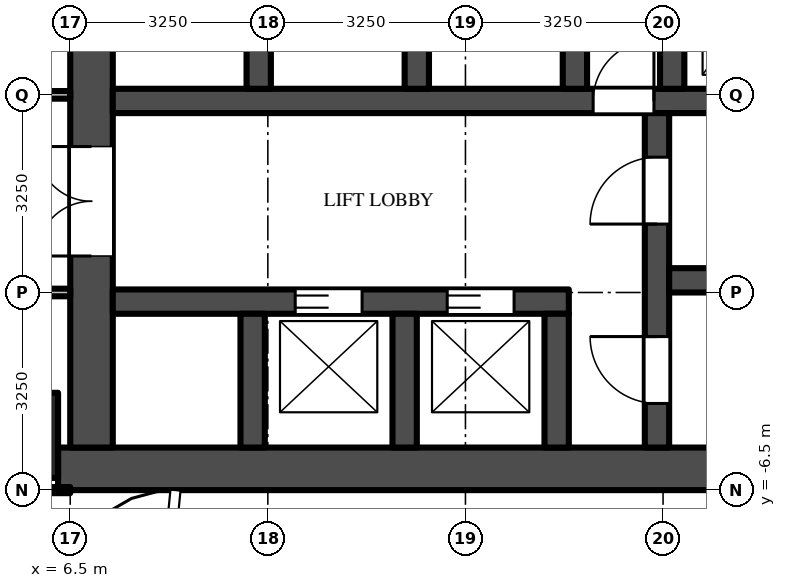
"""IFC4 building model, lengths in metres.
Left out: names, types, materials, properties, quantities, classifications, styles, units other than length and angle.
Written with IfcOpenShell. Run it as: python <this file> out.ifc"""

import sys

from ifc_helpers import new_model, si_unit, direction, frame, frame_2d, origin, origin_2d, place, context, subcontext, project, spatial, rectangle, extrude, source, transform, mapped, element, fill, save


model = new_model("IFC4")
c1 = context("Model", 3, precision=1e-05, world=origin(), true_north=direction((0.0, 1.0)))
c2 = subcontext(c1, "Body", "Model", "MODEL_VIEW")
j1 = project(units=[si_unit("LENGTHUNIT", "METRE"), si_unit("PLANEANGLEUNIT", "RADIAN")], contexts=[c1])
p1 = place(None, origin())
s1 = spatial("IfcSite", under=j1, at=p1, CompositionType="ELEMENT")
p2 = place(p1, origin())
s2 = spatial("IfcBuilding", under=s1, at=p2, CompositionType="ELEMENT")
p3 = place(p2, frame((0.0, 0.0, 88.0)))
s3 = spatial("IfcBuildingStorey", under=s2, at=p3, CompositionType="ELEMENT", Elevation=88.0)
m1 = source(origin(), c2, "Body", "SweptSolid", [
    extrude(rectangle(XDim=1.4, YDim=1.4, at=origin_2d()), origin(), (0.0, 0.0, 1.0), 4.5),
])
p4 = place(p3, frame((5.6, -5.6, 0.0), z_axis=(0.0, 0.0, 1.0), x_axis=(1.0, 0.0, 0.0)))
e1 = element("IfcColumn", 1, at=p4, inside=s3, PredefinedType="COLUMN", context=c2, shape_type="MappedRepresentation", body=[
    mapped(m1, transform((0.0, 0.0, 0.0))),
])
m2 = source(origin(), c2, "Body", "SweptSolid", [
    extrude(rectangle(XDim=16.45, YDim=0.7, at=frame_2d((8.225, 0.0))), origin(), (0.0, 0.0, 1.0), 4.2),
])
p5 = place(p3, frame((6.3, -6.15, 0.0), z_axis=(0.0, 0.0, 1.0), x_axis=(1.0, 0.0, 0.0)))
e2 = element("IfcWall", 2, at=p5, inside=s3, PredefinedType="SHEAR", context=c2, shape_type="MappedRepresentation", body=[
    mapped(m2, transform((0.0, 0.0, 0.0))),
])
m3 = source(origin(), c2, "Body", "SweptSolid", [
    extrude(rectangle(XDim=9.05, YDim=0.7, at=frame_2d((4.525, 0.0))), origin(), (0.0, 0.0, 1.0), 4.2),
])
p6 = place(p3, frame((6.85, -5.8, 0.0), z_axis=(0.0, 0.0, 1.0), x_axis=(0.0, 1.0, 0.0)))
e3 = element("IfcWall", 3, at=p6, inside=s3, PredefinedType="SHEAR", context=c2, shape_type="MappedRepresentation", body=[
    mapped(m3, transform((0.0, 0.0, 0.0))),
])
m4 = source(origin(), c2, "Body", "SweptSolid", [
    extrude(rectangle(XDim=1.8, YDim=2.1, at=frame_2d((0.9, 1.05))), frame((0.0, 0.36, 0.0), z_axis=(0.0, -1.0, 0.0), x_axis=(1.0, 0.0, 0.0)), (0.0, 0.0, 1.0), 0.72),
])
p7 = place(p6, frame((3.15, 0.0, 0.0)))
e4 = element("IfcOpeningElement", 4, at=p7, cuts=e3, PredefinedType="OPENING", context=c2, shape_type="MappedRepresentation", body=[
    mapped(m4, transform((0.0, 0.0, 0.0))),
])
m5 = source(origin(), c2, "Body", "SweptSolid", [
    extrude(rectangle(XDim=7.5, YDim=0.4, at=frame_2d((3.75, 0.0))), origin(), (0.0, 0.0, 1.0), 4.2),
])
p8 = place(p3, frame((7.2, -3.4, 0.0), z_axis=(0.0, 0.0, 1.0), x_axis=(1.0, 0.0, 0.0)))
e5 = element("IfcWall", 5, at=p8, inside=s3, PredefinedType="SHEAR", context=c2, shape_type="MappedRepresentation", body=[
    mapped(m5, transform((0.0, 0.0, 0.0))),
])
m6 = source(origin(), c2, "Body", "SweptSolid", [
    extrude(rectangle(XDim=1.1, YDim=2.1, at=frame_2d((0.55, 1.05))), frame((0.0, 0.21, 0.0), z_axis=(0.0, -1.0, 0.0), x_axis=(1.0, 0.0, 0.0)), (0.0, 0.0, 1.0), 0.42),
])
p9 = place(p8, frame((3.0, 0.0, 0.0)))
e6 = element("IfcOpeningElement", 6, at=p9, cuts=e5, PredefinedType="OPENING", context=c2, shape_type="MappedRepresentation", body=[
    mapped(m6, transform((0.0, 0.0, 0.0))),
])
p10 = place(p8, frame((5.5, 0.0, 0.0)))
e7 = element("IfcOpeningElement", 7, at=p10, cuts=e5, PredefinedType="OPENING", context=c2, shape_type="MappedRepresentation", body=[
    mapped(m6, transform((0.0, 0.0, 0.0))),
])
m7 = source(origin(), c2, "Body", "SweptSolid", [
    extrude(rectangle(XDim=14.85, YDim=0.4, at=frame_2d((7.425, 0.0))), origin(), (0.0, 0.0, 1.0), 4.2),
])
p11 = place(p3, frame((7.2, -0.1, 0.0), z_axis=(0.0, 0.0, 1.0), x_axis=(1.0, 0.0, 0.0)))
e8 = element("IfcWall", 8, at=p11, inside=s3, PredefinedType="SHEAR", context=c2, shape_type="MappedRepresentation", body=[
    mapped(m7, transform((0.0, 0.0, 0.0))),
])
m8 = source(origin(), c2, "Body", "SweptSolid", [
    extrude(rectangle(XDim=1.0, YDim=2.1, at=frame_2d((0.5, 1.05))), frame((0.0, 0.21, 0.0), z_axis=(0.0, -1.0, 0.0), x_axis=(1.0, 0.0, 0.0)), (0.0, 0.0, 1.0), 0.42),
])
p12 = place(p11, frame((7.9, 0.0, 0.0)))
e9 = element("IfcOpeningElement", 9, at=p12, cuts=e8, PredefinedType="OPENING", context=c2, shape_type="MappedRepresentation", body=[
    mapped(m8, transform((0.0, 0.0, 0.0))),
])
m9 = source(origin(), c2, "Body", "SweptSolid", [
    extrude(rectangle(XDim=5.5, YDim=0.4, at=frame_2d((2.75, 0.0))), origin(), (0.0, 0.0, 1.0), 4.2),
])
p13 = place(p3, frame((16.15, -5.8, 0.0), z_axis=(0.0, 0.0, 1.0), x_axis=(0.0, 1.0, 0.0)))
e10 = element("IfcWall", 10, at=p13, inside=s3, PredefinedType="SHEAR", context=c2, shape_type="MappedRepresentation", body=[
    mapped(m9, transform((0.0, 0.0, 0.0))),
])
p14 = place(p13, frame((0.725, 0.0, 0.0)))
e11 = element("IfcOpeningElement", 11, at=p14, cuts=e10, PredefinedType="OPENING", context=c2, shape_type="MappedRepresentation", body=[
    mapped(m6, transform((0.0, 0.0, 0.0))),
])
p15 = place(p13, frame((3.675, 0.0, 0.0)))
e12 = element("IfcOpeningElement", 12, at=p15, cuts=e10, PredefinedType="OPENING", context=c2, shape_type="MappedRepresentation", body=[
    mapped(m6, transform((0.0, 0.0, 0.0))),
])
m10 = source(origin(), c2, "Body", "SweptSolid", [
    extrude(rectangle(XDim=5.7, YDim=0.4, at=frame_2d((2.85, 0.0))), origin(), (0.0, 0.0, 1.0), 4.2),
])
p16 = place(p3, frame((16.35, -3.05, 0.0), z_axis=(0.0, 0.0, 1.0), x_axis=(1.0, 0.0, 0.0)))
e13 = element("IfcWall", 13, at=p16, inside=s3, PredefinedType="SHEAR", context=c2, shape_type="MappedRepresentation", body=[
    mapped(m10, transform((0.0, 0.0, 0.0))),
])
m11 = source(origin(), c2, "Body", "SweptSolid", [
    extrude(rectangle(XDim=2.2, YDim=0.4, at=frame_2d((1.1, 0.0))), origin(), (0.0, 0.0, 1.0), 4.2),
])
for number, where, z_axis, x_axis in (
    (14, (9.5, -5.8, 0.0), (0.0, 0.0, 1.0), (0.0, 1.0, 0.0)),
    (15, (12.0, -5.8, 0.0), (0.0, 0.0, 1.0), (0.0, 1.0, 0.0)),
    (16, (14.5, -5.8, 0.0), (0.0, 0.0, 1.0), (0.0, 1.0, 0.0)),
):
    element("IfcWall", number, at=place(p3, frame(where, z_axis=z_axis, x_axis=x_axis)), inside=s3, PredefinedType="SHEAR", context=c2, shape_type="MappedRepresentation", body=[
        mapped(m11, transform((0.0, 0.0, 0.0))),
    ])
m12 = source(origin(), c2, "Body", "SweptSolid", [
    extrude(rectangle(XDim=2.45, YDim=0.4, at=frame_2d((1.225, 0.0))), origin(), (0.0, 0.0, 1.0), 4.2),
])
for number, where, z_axis, x_axis in (
    (17, (9.6, 0.1, 0.0), (0.0, 0.0, 1.0), (0.0, 1.0, 0.0)),
    (18, (12.2, 0.1, 0.0), (0.0, 0.0, 1.0), (0.0, 1.0, 0.0)),
    (19, (14.8, 0.1, 0.0), (0.0, 0.0, 1.0), (0.0, 1.0, 0.0)),
    (20, (16.4, 0.1, 0.0), (0.0, 0.0, 1.0), (0.0, 1.0, 0.0)),
):
    element("IfcWall", number, at=place(p3, frame(where, z_axis=z_axis, x_axis=x_axis)), inside=s3, PredefinedType="SHEAR", context=c2, shape_type="MappedRepresentation", body=[
        mapped(m12, transform((0.0, 0.0, 0.0))),
    ])
m13 = source(origin(), c2, "Body", "SweptSolid", [
    extrude(rectangle(XDim=5.363, YDim=0.1, at=frame_2d((2.681, 0.0))), origin(), (0.0, 0.0, 1.0), 3.28),
])
p17 = place(p3, frame((1.137, -6.5, 0.0), z_axis=(0.0, 0.0, 1.0), x_axis=(1.0, 0.0, 0.0)))
e21 = element("IfcWall", 21, at=p17, inside=s3, PredefinedType="PARTITIONING", context=c2, shape_type="MappedRepresentation", body=[
    mapped(m13, transform((0.0, 0.0, 0.0))),
])
m14 = source(origin(), c2, "Body", "SweptSolid", [
    extrude(rectangle(XDim=5.363, YDim=0.125, at=frame_2d((2.681, 0.0))), origin(), (0.0, 0.0, 1.0), 3.418),
])
p18 = place(p3, frame((6.5, -3.25, 0.0), z_axis=(0.0, 0.0, 1.0), x_axis=(-1.0, 0.0, 0.0)))
e22 = element("IfcWall", 22, at=p18, inside=s3, PredefinedType="PARTITIONING", context=c2, shape_type="MappedRepresentation", body=[
    mapped(m14, transform((0.0, 0.0, 0.0))),
])
m15 = source(origin(), c2, "Body", "SweptSolid", [
    extrude(rectangle(XDim=1.1, YDim=2.1, at=frame_2d((0.55, 1.05))), frame((0.0, 0.073, 0.0), z_axis=(0.0, -1.0, 0.0), x_axis=(1.0, 0.0, 0.0)), (0.0, 0.0, 1.0), 0.145),
])
p19 = place(p18, frame((0.35, 0.0, 0.0)))
e23 = element("IfcOpeningElement", 23, at=p19, cuts=e22, PredefinedType="OPENING", context=c2, shape_type="MappedRepresentation", body=[
    mapped(m15, transform((0.0, 0.0, 0.0))),
])
p20 = place(p3, frame((6.5, 0.0, 0.0), z_axis=(0.0, 0.0, 1.0), x_axis=(-1.0, 0.0, 0.0)))
e24 = element("IfcWall", 24, at=p20, inside=s3, PredefinedType="PARTITIONING", context=c2, shape_type="MappedRepresentation", body=[
    mapped(m14, transform((0.0, 0.0, 0.0))),
])
m16 = source(origin(), c2, "Body", "SweptSolid", [
    extrude(rectangle(XDim=1.0, YDim=2.1, at=frame_2d((0.5, 1.05))), frame((0.0, 0.073, 0.0), z_axis=(0.0, -1.0, 0.0), x_axis=(1.0, 0.0, 0.0)), (0.0, 0.0, 1.0), 0.145),
])
p21 = place(p20, frame((3.95, 0.0, 0.0)))
e25 = element("IfcOpeningElement", 25, at=p21, cuts=e24, PredefinedType="OPENING", context=c2, shape_type="MappedRepresentation", body=[
    mapped(m16, transform((0.0, 0.0, 0.0))),
])
m17 = source(origin(), c2, "Body", "SweptSolid", [
    extrude(rectangle(XDim=1.1, YDim=2.1, at=frame_2d((0.55, 1.05))), frame((0.0, 0.025, 0.0), z_axis=(0.0, -1.0, 0.0), x_axis=(1.0, 0.0, 0.0)), (0.0, 0.0, 1.0), 0.05),
])
p22 = place(p9, origin())
e26 = element("IfcDoor", 26, at=p22, inside=s3, OperationType="DOUBLE_DOOR_SLIDING", PredefinedType="DOOR", context=c2, shape_type="MappedRepresentation", body=[
    mapped(m17, transform((0.0, 0.0, 0.0))),
])
fill(e6, e26)
p23 = place(p10, origin())
e27 = element("IfcDoor", 27, at=p23, inside=s3, OperationType="DOUBLE_DOOR_SLIDING", PredefinedType="DOOR", context=c2, shape_type="MappedRepresentation", body=[
    mapped(m17, transform((0.0, 0.0, 0.0))),
])
fill(e7, e27)
m18 = source(origin(), c2, "Body", "SweptSolid", [
    extrude(rectangle(XDim=1.8, YDim=2.1, at=frame_2d((0.9, 1.05))), frame((0.0, -0.275, 0.0), z_axis=(0.0, -1.0, 0.0), x_axis=(1.0, 0.0, 0.0)), (0.0, 0.0, 1.0), 0.05),
])
p24 = place(p7, origin())
e28 = element("IfcDoor", 28, at=p24, inside=s3, OperationType="DOUBLE_DOOR_SINGLE_SWING", PredefinedType="DOOR", context=c2, shape_type="MappedRepresentation", body=[
    mapped(m18, transform((0.0, 0.0, 0.0))),
])
fill(e4, e28)
p25 = place(p14, origin())
e29 = element("IfcDoor", 29, at=p25, inside=s3, OperationType="SINGLE_SWING_RIGHT", PredefinedType="DOOR", context=c2, shape_type="MappedRepresentation", body=[
    mapped(m17, transform((0.0, 0.0, 0.0))),
])
fill(e11, e29)
p26 = place(p15, origin())
e30 = element("IfcDoor", 30, at=p26, inside=s3, OperationType="SINGLE_SWING_LEFT", PredefinedType="DOOR", context=c2, shape_type="MappedRepresentation", body=[
    mapped(m17, transform((0.0, 0.0, 0.0))),
])
fill(e12, e30)
m19 = source(origin(), c2, "Body", "SweptSolid", [
    extrude(rectangle(XDim=1.0, YDim=2.1, at=frame_2d((0.5, 1.05))), frame((0.0, 0.025, 0.0), z_axis=(0.0, -1.0, 0.0), x_axis=(1.0, 0.0, 0.0)), (0.0, 0.0, 1.0), 0.05),
])
p27 = place(p12, origin())
e31 = element("IfcDoor", 31, at=p27, inside=s3, OperationType="SINGLE_SWING_RIGHT", PredefinedType="DOOR", context=c2, shape_type="MappedRepresentation", body=[
    mapped(m19, transform((0.0, 0.0, 0.0))),
])
fill(e9, e31)
save(model, sys.argv[1])
